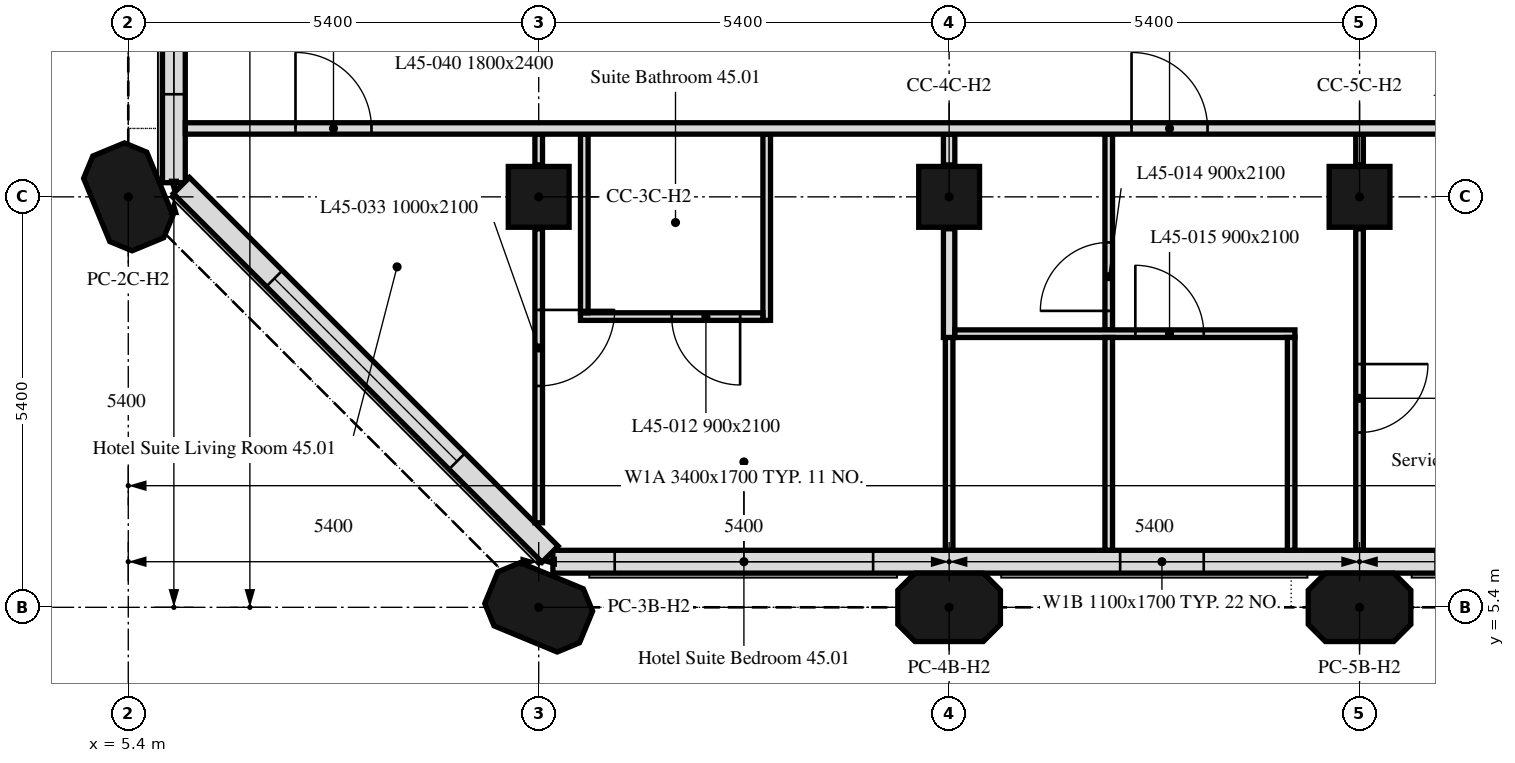
"""IFC4 building model, lengths in metres.
Left out: names, types, materials, properties, quantities, classifications, styles, units other than length and angle.
Written with IfcOpenShell. Run it as: python <this file> out.ifc"""

import sys

from ifc_helpers import new_model, si_unit, direction, frame, frame_2d, origin, origin_2d, place, context, subcontext, project, spatial, polyline, rectangle, outline, extrude, element, fill, save


model = new_model("IFC4")
c1 = context("Model", 3, precision=1e-05, world=origin(), true_north=direction((0.0, 1.0)))
c2 = subcontext(c1, "Body", "Model", "MODEL_VIEW")
j1 = project(units=[si_unit("LENGTHUNIT", "METRE"), si_unit("PLANEANGLEUNIT", "RADIAN")], contexts=[c1])
p1 = place(None, origin())
s1 = spatial("IfcSite", under=j1, at=p1, CompositionType="ELEMENT")
p2 = place(p1, origin())
s2 = spatial("IfcBuilding", under=s1, at=p2, CompositionType="ELEMENT")
p3 = place(p2, frame((0.0, 0.0, 187.3)))
s3 = spatial("IfcBuildingStorey", under=s2, at=p3, CompositionType="ELEMENT", Elevation=187.3)
for number, where, z_axis, x_axis in (
    (1, (10.8, 5.4, 0.0), (0.0, 0.0, 1.0), (-0.924, 0.383, 0.0)),
    (2, (16.2, 5.4, 0.0), (0.0, 0.0, 1.0), (1.0, 0.0, 0.0)),
    (3, (21.6, 5.4, 0.0), (0.0, 0.0, 1.0), (1.0, 0.0, 0.0)),
    (4, (5.4, 10.8, 0.0), (0.0, 0.0, 1.0), (-0.383, 0.924, 0.0)),
):
    element("IfcColumn", number, at=place(p3, frame(where, z_axis=z_axis, x_axis=x_axis)), inside=s3, PredefinedType="COLUMN", context=c2, shape_type="SweptSolid", body=[
        extrude(outline(polyline([(-0.45, -0.45), (0.45, -0.45), (0.675, -0.225), (0.675, 0.225), (0.45, 0.45), (-0.45, 0.45), (-0.675, 0.225), (-0.675, -0.225), (-0.45, -0.45)])), origin(), (0.0, 0.0, 1.0), 3.0),
    ])
for number, where, z_axis, x_axis in (
    (5, (10.8, 10.8, 0.0), (0.0, 0.0, 1.0), (1.0, 0.0, 0.0)),
    (6, (16.2, 10.8, 0.0), (0.0, 0.0, 1.0), (1.0, 0.0, 0.0)),
    (7, (21.6, 10.8, 0.0), (0.0, 0.0, 1.0), (1.0, 0.0, 0.0)),
):
    element("IfcColumn", number, at=place(p3, frame(where, z_axis=z_axis, x_axis=x_axis)), inside=s3, PredefinedType="COLUMN", context=c2, shape_type="SweptSolid", body=[
        extrude(rectangle(XDim=0.8, YDim=0.8, at=origin_2d()), origin(), (0.0, 0.0, 1.0), 3.0),
    ])
p4 = place(p3, frame((10.986, 6.0, 0.0), z_axis=(0.0, 0.0, 1.0), x_axis=(1.0, 0.0, 0.0)))
e8 = element("IfcWall", 8, at=p4, inside=s3, PredefinedType="SOLIDWALL", context=c2, shape_type="SweptSolid", body=[
    extrude(rectangle(XDim=32.027, YDim=0.3, at=frame_2d((16.014, 0.0))), origin(), (0.0, 0.0, 1.0), 3.0),
])
p5 = place(p4, frame((0.814, 0.0, 0.9)))
e9 = element("IfcOpeningElement", 9, at=p5, cuts=e8, PredefinedType="OPENING", context=c2, shape_type="SweptSolid", body=[
    extrude(rectangle(XDim=3.4, YDim=1.7, at=frame_2d((1.7, 0.85))), frame((0.0, 0.16, 0.0), z_axis=(0.0, -1.0, 0.0), x_axis=(1.0, 0.0, 0.0)), (0.0, 0.0, 1.0), 0.32),
])
p6 = place(p4, frame((7.464, 0.0, 0.9)))
e10 = element("IfcOpeningElement", 10, at=p6, cuts=e8, PredefinedType="OPENING", context=c2, shape_type="SweptSolid", body=[
    extrude(rectangle(XDim=1.1, YDim=1.7, at=frame_2d((0.55, 0.85))), frame((0.0, 0.16, 0.0), z_axis=(0.0, -1.0, 0.0), x_axis=(1.0, 0.0, 0.0)), (0.0, 0.0, 1.0), 0.32),
])
p7 = place(p4, frame((11.614, 0.0, 0.9)))
e11 = element("IfcOpeningElement", 11, at=p7, cuts=e8, PredefinedType="OPENING", context=c2, shape_type="SweptSolid", body=[
    extrude(rectangle(XDim=3.4, YDim=1.7, at=frame_2d((1.7, 0.85))), frame((0.0, 0.16, 0.0), z_axis=(0.0, -1.0, 0.0), x_axis=(1.0, 0.0, 0.0)), (0.0, 0.0, 1.0), 0.32),
])
p8 = place(p4, frame((18.264, 0.0, 0.9)))
e12 = element("IfcOpeningElement", 12, at=p8, cuts=e8, PredefinedType="OPENING", context=c2, shape_type="SweptSolid", body=[
    extrude(rectangle(XDim=1.1, YDim=1.7, at=frame_2d((0.55, 0.85))), frame((0.0, 0.16, 0.0), z_axis=(0.0, -1.0, 0.0), x_axis=(1.0, 0.0, 0.0)), (0.0, 0.0, 1.0), 0.32),
])
p9 = place(p4, frame((22.414, 0.0, 0.9)))
e13 = element("IfcOpeningElement", 13, at=p9, cuts=e8, PredefinedType="OPENING", context=c2, shape_type="SweptSolid", body=[
    extrude(rectangle(XDim=3.4, YDim=1.7, at=frame_2d((1.7, 0.85))), frame((0.0, 0.16, 0.0), z_axis=(0.0, -1.0, 0.0), x_axis=(1.0, 0.0, 0.0)), (0.0, 0.0, 1.0), 0.32),
])
p10 = place(p4, frame((28.164, 0.0, 0.9)))
e14 = element("IfcOpeningElement", 14, at=p10, cuts=e8, PredefinedType="OPENING", context=c2, shape_type="SweptSolid", body=[
    extrude(rectangle(XDim=1.1, YDim=1.7, at=frame_2d((0.55, 0.85))), frame((0.0, 0.16, 0.0), z_axis=(0.0, -1.0, 0.0), x_axis=(1.0, 0.0, 0.0)), (0.0, 0.0, 1.0), 0.32),
])
p11 = place(p3, frame((6.0, 16.2, 0.0), z_axis=(0.0, 0.0, 1.0), x_axis=(0.0, -1.0, 0.0)))
e15 = element("IfcWall", 15, at=p11, inside=s3, PredefinedType="SOLIDWALL", context=c2, shape_type="SweptSolid", body=[
    extrude(rectangle(XDim=5.214, YDim=0.3, at=frame_2d((2.607, 0.0))), origin(), (0.0, 0.0, 1.0), 3.0),
])
p12 = place(p11, frame((1.35, 0.0, 0.9)))
e16 = element("IfcOpeningElement", 16, at=p12, cuts=e15, PredefinedType="OPENING", context=c2, shape_type="SweptSolid", body=[
    extrude(rectangle(XDim=1.1, YDim=1.7, at=frame_2d((0.55, 0.85))), frame((0.0, 0.16, 0.0), z_axis=(0.0, -1.0, 0.0), x_axis=(1.0, 0.0, 0.0)), (0.0, 0.0, 1.0), 0.32),
])
p13 = place(p11, frame((2.95, 0.0, 0.9)))
e17 = element("IfcOpeningElement", 17, at=p13, cuts=e15, PredefinedType="OPENING", context=c2, shape_type="SweptSolid", body=[
    extrude(rectangle(XDim=1.1, YDim=1.7, at=frame_2d((0.55, 0.85))), frame((0.0, 0.16, 0.0), z_axis=(0.0, -1.0, 0.0), x_axis=(1.0, 0.0, 0.0)), (0.0, 0.0, 1.0), 0.32),
])
p14 = place(p3, frame((6.099, 10.949, 0.0), z_axis=(0.0, 0.0, 1.0), x_axis=(0.707106781187, -0.707106781187, 0.0)))
e18 = element("IfcWall", 18, at=p14, inside=s3, PredefinedType="SOLIDWALL", context=c2, shape_type="SweptSolid", body=[
    extrude(rectangle(XDim=6.86, YDim=0.3, at=frame_2d((3.43, 0.0))), origin(), (0.0, 0.0, 1.0), 3.0),
])
p15 = place(p14, frame((1.73, 0.0, 0.9)))
e19 = element("IfcOpeningElement", 19, at=p15, cuts=e18, PredefinedType="OPENING", context=c2, shape_type="SweptSolid", body=[
    extrude(rectangle(XDim=3.4, YDim=1.7, at=frame_2d((1.7, 0.85))), frame((0.0, 0.16, 0.0), z_axis=(0.0, -1.0, 0.0), x_axis=(1.0, 0.0, 0.0)), (0.0, 0.0, 1.0), 0.32),
])
p16 = place(p3, frame((16.2, 6.151, 0.0), z_axis=(0.0, 0.0, 1.0), x_axis=(0.0, 1.0, 0.0)))
e20 = element("IfcWall", 20, at=p16, inside=s3, PredefinedType="PARTITIONING", context=c2, shape_type="SweptSolid", body=[
    extrude(rectangle(XDim=2.899, YDim=0.1, at=frame_2d((1.45, 0.0))), origin(), (0.0, 0.0, 1.0), 3.0),
])
p17 = place(p3, frame((16.2, 8.95, 0.0), z_axis=(0.0, 0.0, 1.0), x_axis=(0.0, 1.0, 0.0)))
e21 = element("IfcWall", 21, at=p17, inside=s3, PredefinedType="PARTITIONING", context=c2, shape_type="SweptSolid", body=[
    extrude(rectangle(XDim=1.43, YDim=0.15, at=frame_2d((0.715, 0.0))), origin(), (0.0, 0.0, 1.0), 3.0),
])
p18 = place(p3, frame((16.2, 11.22, 0.0), z_axis=(0.0, 0.0, 1.0), x_axis=(0.0, 1.0, 0.0)))
e22 = element("IfcWall", 22, at=p18, inside=s3, PredefinedType="PARTITIONING", context=c2, shape_type="SweptSolid", body=[
    extrude(rectangle(XDim=0.405, YDim=0.15, at=frame_2d((0.203, 0.0))), origin(), (0.0, 0.0, 1.0), 3.0),
])
p19 = place(p3, frame((13.8, 11.625, 0.0), z_axis=(0.0, 0.0, 1.0), x_axis=(0.0, -1.0, 0.0)))
e23 = element("IfcWall", 23, at=p19, inside=s3, PredefinedType="PARTITIONING", context=c2, shape_type="SweptSolid", body=[
    extrude(rectangle(XDim=2.45, YDim=0.1, at=frame_2d((1.225, 0.0))), origin(), (0.0, 0.0, 1.0), 3.0),
])
p20 = place(p3, frame((13.75, 9.225, 0.0), z_axis=(0.0, 0.0, 1.0), x_axis=(-1.0, 0.0, 0.0)))
e24 = element("IfcWall", 24, at=p20, inside=s3, PredefinedType="PARTITIONING", context=c2, shape_type="SweptSolid", body=[
    extrude(rectangle(XDim=2.4, YDim=0.1, at=frame_2d((1.2, 0.0))), origin(), (0.0, 0.0, 1.0), 3.0),
])
p21 = place(p20, frame((0.3, 0.0, 0.0)))
e25 = element("IfcOpeningElement", 25, at=p21, cuts=e24, PredefinedType="OPENING", context=c2, shape_type="SweptSolid", body=[
    extrude(rectangle(XDim=0.9, YDim=2.1, at=frame_2d((0.45, 1.05))), frame((0.0, 0.05, 0.0), z_axis=(0.0, -1.0, 0.0), x_axis=(1.0, 0.0, 0.0)), (0.0, 0.0, 1.0), 0.1),
])
p22 = place(p3, frame((11.4, 9.275, 0.0), z_axis=(0.0, 0.0, 1.0), x_axis=(0.0, 1.0, 0.0)))
e26 = element("IfcWall", 26, at=p22, inside=s3, PredefinedType="PARTITIONING", context=c2, shape_type="SweptSolid", body=[
    extrude(rectangle(XDim=2.35, YDim=0.1, at=frame_2d((1.175, 0.0))), origin(), (0.0, 0.0, 1.0), 3.0),
])
p23 = place(p3, frame((10.8, 11.625, 0.0), z_axis=(0.0, 0.0, 1.0), x_axis=(0.0, -1.0, 0.0)))
e27 = element("IfcWall", 27, at=p23, inside=s3, PredefinedType="PARTITIONING", context=c2, shape_type="SweptSolid", body=[
    extrude(rectangle(XDim=0.405, YDim=0.1, at=frame_2d((0.203, 0.0))), origin(), (0.0, 0.0, 1.0), 3.0),
])
p24 = place(p3, frame((10.8, 10.38, 0.0), z_axis=(0.0, 0.0, 1.0), x_axis=(0.0, -1.0, 0.0)))
e28 = element("IfcWall", 28, at=p24, inside=s3, PredefinedType="PARTITIONING", context=c2, shape_type="SweptSolid", body=[
    extrude(rectangle(XDim=3.868, YDim=0.1, at=frame_2d((1.934, 0.0))), origin(), (0.0, 0.0, 1.0), 3.0),
])
p25 = place(p24, frame((1.067, 0.0, 0.0)))
e29 = element("IfcOpeningElement", 29, at=p25, cuts=e28, PredefinedType="OPENING", context=c2, shape_type="SweptSolid", body=[
    extrude(rectangle(XDim=1.0, YDim=2.1, at=frame_2d((0.5, 1.05))), frame((0.0, 0.05, 0.0), z_axis=(0.0, -1.0, 0.0), x_axis=(1.0, 0.0, 0.0)), (0.0, 0.0, 1.0), 0.1),
])
p26 = place(p3, frame((21.6, 11.625, 0.0), z_axis=(0.0, 0.0, 1.0), x_axis=(0.0, -1.0, 0.0)))
e30 = element("IfcWall", 30, at=p26, inside=s3, PredefinedType="PARTITIONING", context=c2, shape_type="SweptSolid", body=[
    extrude(rectangle(XDim=0.405, YDim=0.1, at=frame_2d((0.203, 0.0))), origin(), (0.0, 0.0, 1.0), 3.0),
])
p27 = place(p3, frame((21.6, 10.38, 0.0), z_axis=(0.0, 0.0, 1.0), x_axis=(0.0, -1.0, 0.0)))
e31 = element("IfcWall", 31, at=p27, inside=s3, PredefinedType="PARTITIONING", context=c2, shape_type="SweptSolid", body=[
    extrude(rectangle(XDim=4.229, YDim=0.1, at=frame_2d((2.115, 0.0))), origin(), (0.0, 0.0, 1.0), 3.0),
])
p28 = place(p27, frame((1.78, 0.0, 0.0)))
e32 = element("IfcOpeningElement", 32, at=p28, cuts=e31, PredefinedType="OPENING", context=c2, shape_type="SweptSolid", body=[
    extrude(rectangle(XDim=0.9, YDim=2.1, at=frame_2d((0.45, 1.05))), frame((0.0, 0.05, 0.0), z_axis=(0.0, -1.0, 0.0), x_axis=(1.0, 0.0, 0.0)), (0.0, 0.0, 1.0), 0.1),
])
p29 = place(p3, frame((18.3, 9.05, 0.0), z_axis=(0.0, 0.0, 1.0), x_axis=(0.0, 1.0, 0.0)))
e33 = element("IfcWall", 33, at=p29, inside=s3, PredefinedType="PARTITIONING", context=c2, shape_type="SweptSolid", body=[
    extrude(rectangle(XDim=2.575, YDim=0.1, at=frame_2d((1.288, 0.0))), origin(), (0.0, 0.0, 1.0), 3.0),
])
p30 = place(p29, frame((0.25, 0.0, 0.0)))
e34 = element("IfcOpeningElement", 34, at=p30, cuts=e33, PredefinedType="OPENING", context=c2, shape_type="SweptSolid", body=[
    extrude(rectangle(XDim=0.9, YDim=2.1, at=frame_2d((0.45, 1.05))), frame((0.0, 0.05, 0.0), z_axis=(0.0, -1.0, 0.0), x_axis=(1.0, 0.0, 0.0)), (0.0, 0.0, 1.0), 0.1),
])
p31 = place(p3, frame((16.275, 9.0, 0.0), z_axis=(0.0, 0.0, 1.0), x_axis=(1.0, 0.0, 0.0)))
e35 = element("IfcWall", 35, at=p31, inside=s3, PredefinedType="PARTITIONING", context=c2, shape_type="SweptSolid", body=[
    extrude(rectangle(XDim=4.475, YDim=0.1, at=frame_2d((2.238, 0.0))), origin(), (0.0, 0.0, 1.0), 3.0),
])
p32 = place(p31, frame((2.375, 0.0, 0.0)))
e36 = element("IfcOpeningElement", 36, at=p32, cuts=e35, PredefinedType="OPENING", context=c2, shape_type="SweptSolid", body=[
    extrude(rectangle(XDim=0.9, YDim=2.1, at=frame_2d((0.45, 1.05))), frame((0.0, 0.05, 0.0), z_axis=(0.0, -1.0, 0.0), x_axis=(1.0, 0.0, 0.0)), (0.0, 0.0, 1.0), 0.1),
])
for number, where, z_axis, x_axis in (
    (37, (20.7, 8.95, 0.0), (0.0, 0.0, 1.0), (0.0, -1.0, 0.0)),
    (38, (18.3, 8.95, 0.0), (0.0, 0.0, 1.0), (0.0, -1.0, 0.0)),
):
    element("IfcWall", number, at=place(p3, frame(where, z_axis=z_axis, x_axis=x_axis)), inside=s3, PredefinedType="PARTITIONING", context=c2, shape_type="SweptSolid", body=[
        extrude(rectangle(XDim=2.799, YDim=0.1, at=frame_2d((1.399, 0.0))), origin(), (0.0, 0.0, 1.0), 3.0),
    ])
p33 = place(p3, frame((6.151, 11.7, 0.0), z_axis=(0.0, 0.0, 1.0), x_axis=(1.0, 0.0, 0.0)))
e39 = element("IfcWall", 39, at=p33, inside=s3, PredefinedType="PARTITIONING", context=c2, shape_type="SweptSolid", body=[
    extrude(rectangle(XDim=41.698, YDim=0.15, at=frame_2d((20.849, 0.0))), origin(), (0.0, 0.0, 1.0), 3.0),
])
p34 = place(p33, frame((1.449, 0.0, 0.0)))
e40 = element("IfcOpeningElement", 40, at=p34, cuts=e39, PredefinedType="OPENING", context=c2, shape_type="SweptSolid", body=[
    extrude(rectangle(XDim=1.0, YDim=2.1, at=frame_2d((0.5, 1.05))), frame((0.0, 0.075, 0.0), z_axis=(0.0, -1.0, 0.0), x_axis=(1.0, 0.0, 0.0)), (0.0, 0.0, 1.0), 0.15),
])
p35 = place(p33, frame((37.954, 0.0, 0.0)))
e41 = element("IfcOpeningElement", 41, at=p35, cuts=e39, PredefinedType="OPENING", context=c2, shape_type="SweptSolid", body=[
    extrude(rectangle(XDim=1.0, YDim=2.1, at=frame_2d((0.5, 1.05))), frame((0.0, 0.075, 0.0), z_axis=(0.0, -1.0, 0.0), x_axis=(1.0, 0.0, 0.0)), (0.0, 0.0, 1.0), 0.15),
])
p36 = place(p33, frame((12.449, 0.0, 0.0)))
e42 = element("IfcOpeningElement", 42, at=p36, cuts=e39, PredefinedType="OPENING", context=c2, shape_type="SweptSolid", body=[
    extrude(rectangle(XDim=1.0, YDim=2.1, at=frame_2d((0.5, 1.05))), frame((0.0, 0.075, 0.0), z_axis=(0.0, -1.0, 0.0), x_axis=(1.0, 0.0, 0.0)), (0.0, 0.0, 1.0), 0.15),
])
p37 = place(p33, frame((23.249, 0.0, 0.0)))
e43 = element("IfcOpeningElement", 43, at=p37, cuts=e39, PredefinedType="OPENING", context=c2, shape_type="SweptSolid", body=[
    extrude(rectangle(XDim=1.0, YDim=2.1, at=frame_2d((0.5, 1.05))), frame((0.0, 0.075, 0.0), z_axis=(0.0, -1.0, 0.0), x_axis=(1.0, 0.0, 0.0)), (0.0, 0.0, 1.0), 0.15),
])
p38 = place(p5, origin())
e44 = element("IfcWindow", 44, at=p38, inside=s3, PartitioningType="SINGLE_PANEL", PredefinedType="WINDOW", context=c2, shape_type="SweptSolid", body=[
    extrude(rectangle(XDim=3.4, YDim=1.7, at=frame_2d((1.7, 0.85))), frame((0.0, 0.03, 0.0), z_axis=(0.0, -1.0, 0.0), x_axis=(1.0, 0.0, 0.0)), (0.0, 0.0, 1.0), 0.06),
])
fill(e9, e44)
p39 = place(p6, origin())
e45 = element("IfcWindow", 45, at=p39, inside=s3, PartitioningType="SINGLE_PANEL", PredefinedType="WINDOW", context=c2, shape_type="SweptSolid", body=[
    extrude(rectangle(XDim=1.1, YDim=1.7, at=frame_2d((0.55, 0.85))), frame((0.0, 0.03, 0.0), z_axis=(0.0, -1.0, 0.0), x_axis=(1.0, 0.0, 0.0)), (0.0, 0.0, 1.0), 0.06),
])
fill(e10, e45)
p40 = place(p7, origin())
e46 = element("IfcWindow", 46, at=p40, inside=s3, PartitioningType="SINGLE_PANEL", PredefinedType="WINDOW", context=c2, shape_type="SweptSolid", body=[
    extrude(rectangle(XDim=3.4, YDim=1.7, at=frame_2d((1.7, 0.85))), frame((0.0, 0.03, 0.0), z_axis=(0.0, -1.0, 0.0), x_axis=(1.0, 0.0, 0.0)), (0.0, 0.0, 1.0), 0.06),
])
fill(e11, e46)
p41 = place(p13, origin())
e47 = element("IfcWindow", 47, at=p41, inside=s3, PartitioningType="SINGLE_PANEL", PredefinedType="WINDOW", context=c2, shape_type="SweptSolid", body=[
    extrude(rectangle(XDim=1.1, YDim=1.7, at=frame_2d((0.55, 0.85))), frame((0.0, 0.03, 0.0), z_axis=(0.0, -1.0, 0.0), x_axis=(1.0, 0.0, 0.0)), (0.0, 0.0, 1.0), 0.06),
])
fill(e17, e47)
p42 = place(p15, origin())
e48 = element("IfcWindow", 48, at=p42, inside=s3, PartitioningType="SINGLE_PANEL", PredefinedType="WINDOW", context=c2, shape_type="SweptSolid", body=[
    extrude(rectangle(XDim=3.4, YDim=1.7, at=frame_2d((1.7, 0.85))), frame((0.0, 0.03, 0.0), z_axis=(0.0, -1.0, 0.0), x_axis=(1.0, 0.0, 0.0)), (0.0, 0.0, 1.0), 0.06),
])
fill(e19, e48)
p43 = place(p21, origin())
e49 = element("IfcDoor", 49, at=p43, inside=s3, OperationType="SINGLE_SWING_RIGHT", PredefinedType="DOOR", context=c2, shape_type="SweptSolid", body=[
    extrude(rectangle(XDim=0.9, YDim=2.1, at=frame_2d((0.45, 1.05))), frame((0.0, 0.025, 0.0), z_axis=(0.0, -1.0, 0.0), x_axis=(1.0, 0.0, 0.0)), (0.0, 0.0, 1.0), 0.05),
])
fill(e25, e49)
p44 = place(p30, origin())
e50 = element("IfcDoor", 50, at=p44, inside=s3, OperationType="SINGLE_SWING_RIGHT", PredefinedType="DOOR", context=c2, shape_type="SweptSolid", body=[
    extrude(rectangle(XDim=0.9, YDim=2.1, at=frame_2d((0.45, 1.05))), frame((0.0, 0.025, 0.0), z_axis=(0.0, -1.0, 0.0), x_axis=(1.0, 0.0, 0.0)), (0.0, 0.0, 1.0), 0.05),
])
fill(e34, e50)
p45 = place(p32, origin())
e51 = element("IfcDoor", 51, at=p45, inside=s3, OperationType="SINGLE_SWING_LEFT", PredefinedType="DOOR", context=c2, shape_type="SweptSolid", body=[
    extrude(rectangle(XDim=0.9, YDim=2.1, at=frame_2d((0.45, 1.05))), frame((0.0, 0.025, 0.0), z_axis=(0.0, -1.0, 0.0), x_axis=(1.0, 0.0, 0.0)), (0.0, 0.0, 1.0), 0.05),
])
fill(e36, e51)
p46 = place(p25, origin())
e52 = element("IfcDoor", 52, at=p46, inside=s3, OperationType="SINGLE_SWING_RIGHT", PredefinedType="DOOR", context=c2, shape_type="SweptSolid", body=[
    extrude(rectangle(XDim=1.0, YDim=2.1, at=frame_2d((0.5, 1.05))), frame((0.0, 0.025, 0.0), z_axis=(0.0, -1.0, 0.0), x_axis=(1.0, 0.0, 0.0)), (0.0, 0.0, 1.0), 0.05),
])
fill(e29, e52)
p47 = place(p34, origin())
e53 = element("IfcDoor", 53, at=p47, inside=s3, OperationType="SINGLE_SWING_LEFT", PredefinedType="DOOR", context=c2, shape_type="SweptSolid", body=[
    extrude(rectangle(XDim=1.0, YDim=2.1, at=frame_2d((0.5, 1.05))), frame((0.0, 0.025, 0.0), z_axis=(0.0, -1.0, 0.0), x_axis=(1.0, 0.0, 0.0)), (0.0, 0.0, 1.0), 0.05),
])
fill(e40, e53)
p48 = place(p28, origin())
e54 = element("IfcDoor", 54, at=p48, inside=s3, OperationType="SINGLE_SWING_RIGHT", PredefinedType="DOOR", context=c2, shape_type="SweptSolid", body=[
    extrude(rectangle(XDim=0.9, YDim=2.1, at=frame_2d((0.45, 1.05))), frame((0.0, 0.025, 0.0), z_axis=(0.0, -1.0, 0.0), x_axis=(1.0, 0.0, 0.0)), (0.0, 0.0, 1.0), 0.05),
])
fill(e32, e54)
p49 = place(p36, origin())
e55 = element("IfcDoor", 55, at=p49, inside=s3, OperationType="SINGLE_SWING_RIGHT", PredefinedType="DOOR", context=c2, shape_type="SweptSolid", body=[
    extrude(rectangle(XDim=1.0, YDim=2.1, at=frame_2d((0.5, 1.05))), frame((0.0, 0.025, 0.0), z_axis=(0.0, -1.0, 0.0), x_axis=(1.0, 0.0, 0.0)), (0.0, 0.0, 1.0), 0.05),
])
fill(e42, e55)
save(model, sys.argv[1])
